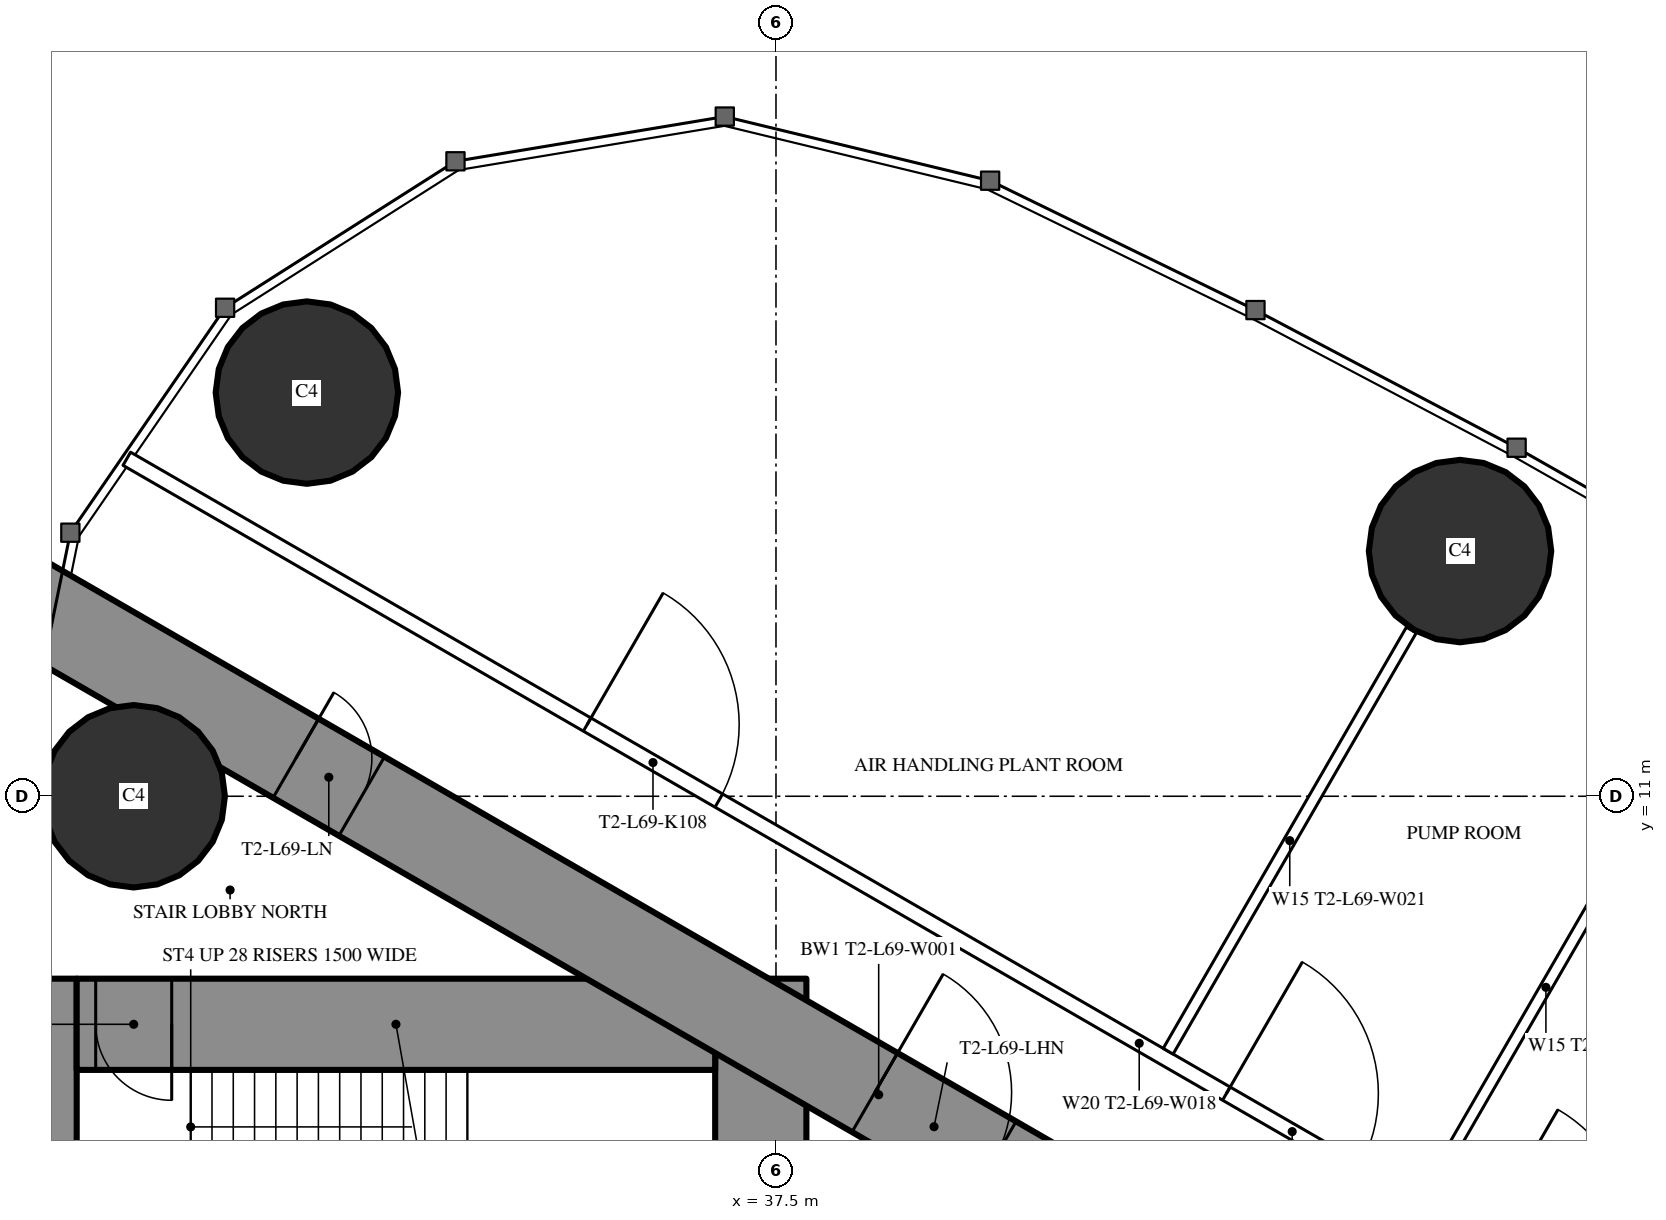
"""IFC4 building model, lengths in metres.
Left out: names, types, materials, properties, quantities, classifications, styles, units other than length and angle.
Written with IfcOpenShell. Run it as: python <this file> out.ifc"""

import sys

from ifc_helpers import new_model, si_unit, direction, frame, frame_2d, origin, origin_2d, place, context, subcontext, project, spatial, rectangle, circle, extrude, element, fill, save


model = new_model("IFC4")
c1 = context("Model", 3, precision=1e-05, world=origin(), true_north=direction((0.0, 1.0)))
c2 = subcontext(c1, "Body", "Model", "MODEL_VIEW")
j1 = project(units=[si_unit("LENGTHUNIT", "METRE"), si_unit("PLANEANGLEUNIT", "RADIAN")], contexts=[c1])
p1 = place(None, origin())
s1 = spatial("IfcSite", under=j1, at=p1, CompositionType="ELEMENT")
p2 = place(p1, origin())
s2 = spatial("IfcBuilding", under=s1, at=p2, CompositionType="ELEMENT")
p3 = place(p2, frame((0.0, 0.0, 263.3)))
s3 = spatial("IfcBuildingStorey", under=s2, at=p3, CompositionType="ELEMENT", Elevation=263.3)
for number, where, z_axis, x_axis in (
    (1, (31.328, 16.311, 0.0), (0.0, 0.0, 1.0), (1.0, 0.0, 0.0)),
    (2, (29.05, 11.0, 0.0), (0.0, 0.0, 1.0), (1.0, 0.0, 0.0)),
    (3, (46.499, 14.226, 0.0), (0.0, 0.0, 1.0), (1.0, 0.0, 0.0)),
):
    element("IfcColumn", number, at=place(p3, frame(where, z_axis=z_axis, x_axis=x_axis)), inside=s3, PredefinedType="COLUMN", context=c2, shape_type="SweptSolid", body=[
        extrude(circle(Radius=1.2, at=origin_2d()), origin(), (0.0, 0.0, 1.0), 5.0),
    ])
p4 = place(p3, frame((27.9, -8.6, 0.0), z_axis=(0.0, 0.0, 1.0), x_axis=(0.0, 1.0, 0.0)))
e4 = element("IfcWall", 4, at=p4, inside=s3, PredefinedType="SHEAR", context=c2, shape_type="SweptSolid", body=[
    extrude(rectangle(XDim=17.2, YDim=0.8, at=frame_2d((8.6, 0.0))), origin(), (0.0, 0.0, 1.0), 5.0),
])
p5 = place(p4, frame((9.35, 0.0, 0.0)))
e5 = element("IfcOpeningElement", 5, at=p5, cuts=e4, PredefinedType="OPENING", context=c2, shape_type="SweptSolid", body=[
    extrude(rectangle(XDim=0.9, YDim=2.2, at=frame_2d((0.45, 1.1))), frame((0.0, 0.41, 0.0), z_axis=(0.0, -1.0, 0.0), x_axis=(1.0, 0.0, 0.0)), (0.0, 0.0, 1.0), 0.82),
])
p6 = place(p3, frame((37.3, -8.6, 0.0), z_axis=(0.0, 0.0, 1.0), x_axis=(0.0, 1.0, 0.0)))
e6 = element("IfcWall", 6, at=p6, inside=s3, PredefinedType="SHEAR", context=c2, shape_type="SweptSolid", body=[
    extrude(rectangle(XDim=17.2, YDim=1.2, at=frame_2d((8.6, 0.0))), origin(), (0.0, 0.0, 1.0), 5.0),
])
p7 = place(p6, frame((7.7, 0.0, 0.0)))
e7 = element("IfcOpeningElement", 7, at=p7, cuts=e6, PredefinedType="OPENING", context=c2, shape_type="SweptSolid", body=[
    extrude(rectangle(XDim=1.8, YDim=2.2, at=frame_2d((0.9, 1.1))), frame((0.0, 0.61, 0.0), z_axis=(0.0, -1.0, 0.0), x_axis=(1.0, 0.0, 0.0)), (0.0, 0.0, 1.0), 1.22),
])
p8 = place(p3, frame((28.3, 8.0, 0.0), z_axis=(0.0, 0.0, 1.0), x_axis=(1.0, 0.0, 0.0)))
e8 = element("IfcWall", 8, at=p8, inside=s3, PredefinedType="SHEAR", context=c2, shape_type="SweptSolid", body=[
    extrude(rectangle(XDim=8.4, YDim=1.2, at=frame_2d((4.2, 0.0))), origin(), (0.0, 0.0, 1.0), 5.0),
])
p9 = place(p8, frame((0.25, 0.0, 0.0)))
e9 = element("IfcOpeningElement", 9, at=p9, cuts=e8, PredefinedType="OPENING", context=c2, shape_type="SweptSolid", body=[
    extrude(rectangle(XDim=1.0, YDim=2.2, at=frame_2d((0.5, 1.1))), frame((0.0, 0.61, 0.0), z_axis=(0.0, -1.0, 0.0), x_axis=(1.0, 0.0, 0.0)), (0.0, 0.0, 1.0), 1.22),
])
p10 = place(p3, frame((27.2, 13.8, 0.0), z_axis=(0.0, 0.0, 1.0), x_axis=(0.866024515034, -0.500001539357, 0.0)))
e10 = element("IfcWall", 10, at=p10, inside=s3, PredefinedType="SHEAR", context=c2, shape_type="SweptSolid", body=[
    extrude(rectangle(XDim=26.907, YDim=1.2, at=frame_2d((13.454, 0.0))), origin(), (0.0, 0.0, 1.0), 5.0),
])
p11 = place(p10, frame((4.6, 0.0, 0.0)))
e11 = element("IfcOpeningElement", 11, at=p11, cuts=e10, PredefinedType="OPENING", context=c2, shape_type="SweptSolid", body=[
    extrude(rectangle(XDim=1.0, YDim=2.2, at=frame_2d((0.5, 1.1))), frame((0.0, 0.61, 0.0), z_axis=(0.0, -1.0, 0.0), x_axis=(1.0, 0.0, 0.0)), (0.0, 0.0, 1.0), 1.22),
])
p12 = place(p10, frame((13.395, 0.0, 0.0)))
e12 = element("IfcOpeningElement", 12, at=p12, cuts=e10, PredefinedType="OPENING", context=c2, shape_type="SweptSolid", body=[
    extrude(rectangle(XDim=1.8, YDim=2.2, at=frame_2d((0.9, 1.1))), frame((0.0, 0.61, 0.0), z_axis=(0.0, -1.0, 0.0), x_axis=(1.0, 0.0, 0.0)), (0.0, 0.0, 1.0), 1.22),
])
p13 = place(p3, frame((28.959, 15.44, 0.0), z_axis=(0.0, 0.0, 1.0), x_axis=(0.866027378611, -0.499996579484, 0.0)))
e13 = element("IfcWall", 13, at=p13, inside=s3, PredefinedType="PARTITIONING", context=c2, shape_type="SweptSolid", body=[
    extrude(rectangle(XDim=30.76, YDim=0.2, at=frame_2d((15.38, 0.0))), origin(), (0.0, 0.0, 1.0), 4.75),
])
p14 = place(p13, frame((26.032, 0.0, 0.0)))
e14 = element("IfcOpeningElement", 14, at=p14, cuts=e13, PredefinedType="OPENING", context=c2, shape_type="SweptSolid", body=[
    extrude(rectangle(XDim=2.0, YDim=2.4, at=frame_2d((1.0, 1.2))), frame((0.0, 0.11, 0.0), z_axis=(0.0, -1.0, 0.0), x_axis=(1.0, 0.0, 0.0)), (0.0, 0.0, 1.0), 0.22),
])
p15 = place(p13, frame((20.587, 0.0, 0.0)))
e15 = element("IfcOpeningElement", 15, at=p15, cuts=e13, PredefinedType="OPENING", context=c2, shape_type="SweptSolid", body=[
    extrude(rectangle(XDim=2.0, YDim=2.4, at=frame_2d((1.0, 1.2))), frame((0.0, 0.11, 0.0), z_axis=(0.0, -1.0, 0.0), x_axis=(1.0, 0.0, 0.0)), (0.0, 0.0, 1.0), 0.22),
])
p16 = place(p13, frame((16.704, 0.0, 0.0)))
e16 = element("IfcOpeningElement", 16, at=p16, cuts=e13, PredefinedType="OPENING", context=c2, shape_type="SweptSolid", body=[
    extrude(rectangle(XDim=2.0, YDim=2.4, at=frame_2d((1.0, 1.2))), frame((0.0, 0.11, 0.0), z_axis=(0.0, -1.0, 0.0), x_axis=(1.0, 0.0, 0.0)), (0.0, 0.0, 1.0), 0.22),
])
p17 = place(p13, frame((6.994, 0.0, 0.0)))
e17 = element("IfcOpeningElement", 17, at=p17, cuts=e13, PredefinedType="OPENING", context=c2, shape_type="SweptSolid", body=[
    extrude(rectangle(XDim=2.0, YDim=2.4, at=frame_2d((1.0, 1.2))), frame((0.0, 0.11, 0.0), z_axis=(0.0, -1.0, 0.0), x_axis=(1.0, 0.0, 0.0)), (0.0, 0.0, 1.0), 0.22),
])
p18 = place(p3, frame((42.66, 7.646, 0.0), z_axis=(0.0, 0.0, 1.0), x_axis=(0.499996592859, 0.866027370889, 0.0)))
e18 = element("IfcWall", 18, at=p18, inside=s3, PredefinedType="PARTITIONING", context=c2, shape_type="SweptSolid", body=[
    extrude(rectangle(XDim=6.398, YDim=0.15, at=frame_2d((3.199, 0.0))), origin(), (0.0, 0.0, 1.0), 3.85),
])
p19 = place(p3, frame((46.023, 5.704, 0.0), z_axis=(0.0, 0.0, 1.0), x_axis=(0.499984478165, 0.866034365135, 0.0)))
e19 = element("IfcWall", 19, at=p19, inside=s3, PredefinedType="PARTITIONING", context=c2, shape_type="SweptSolid", body=[
    extrude(rectangle(XDim=6.426, YDim=0.15, at=frame_2d((3.213, 0.0))), origin(), (0.0, 0.0, 1.0), 3.85),
])
p20 = place(p16, origin())
e20 = element("IfcDoor", 20, at=p20, inside=s3, OperationType="DOUBLE_DOOR_SINGLE_SWING", PredefinedType="DOOR", context=c2, shape_type="SweptSolid", body=[
    extrude(rectangle(XDim=2.0, YDim=2.4, at=frame_2d((1.0, 1.2))), frame((0.0, 0.025, 0.0), z_axis=(0.0, -1.0, 0.0), x_axis=(1.0, 0.0, 0.0)), (0.0, 0.0, 1.0), 0.05),
])
fill(e16, e20)
p21 = place(p17, origin())
e21 = element("IfcDoor", 21, at=p21, inside=s3, OperationType="DOUBLE_DOOR_SINGLE_SWING", PredefinedType="DOOR", context=c2, shape_type="SweptSolid", body=[
    extrude(rectangle(XDim=2.0, YDim=2.4, at=frame_2d((1.0, 1.2))), frame((0.0, 0.025, 0.0), z_axis=(0.0, -1.0, 0.0), x_axis=(1.0, 0.0, 0.0)), (0.0, 0.0, 1.0), 0.05),
])
fill(e17, e21)
p22 = place(p11, origin())
e22 = element("IfcDoor", 22, at=p22, inside=s3, OperationType="SINGLE_SWING_LEFT", PredefinedType="DOOR", context=c2, shape_type="SweptSolid", body=[
    extrude(rectangle(XDim=1.0, YDim=2.2, at=frame_2d((0.5, 1.1))), frame((0.0, 0.025, 0.0), z_axis=(0.0, -1.0, 0.0), x_axis=(1.0, 0.0, 0.0)), (0.0, 0.0, 1.0), 0.05),
])
fill(e11, e22)
p23 = place(p12, origin())
e23 = element("IfcDoor", 23, at=p23, inside=s3, OperationType="DOUBLE_DOOR_SINGLE_SWING", PredefinedType="DOOR", context=c2, shape_type="SweptSolid", body=[
    extrude(rectangle(XDim=1.8, YDim=2.2, at=frame_2d((0.9, 1.1))), frame((0.0, 0.025, 0.0), z_axis=(0.0, -1.0, 0.0), x_axis=(1.0, 0.0, 0.0)), (0.0, 0.0, 1.0), 0.05),
])
fill(e12, e23)
p24 = place(p9, origin())
e24 = element("IfcDoor", 24, at=p24, inside=s3, OperationType="SINGLE_SWING_RIGHT", PredefinedType="DOOR", context=c2, shape_type="SweptSolid", body=[
    extrude(rectangle(XDim=1.0, YDim=2.2, at=frame_2d((0.5, 1.1))), frame((0.0, 0.025, 0.0), z_axis=(0.0, -1.0, 0.0), x_axis=(1.0, 0.0, 0.0)), (0.0, 0.0, 1.0), 0.05),
])
fill(e9, e24)
save(model, sys.argv[1])
